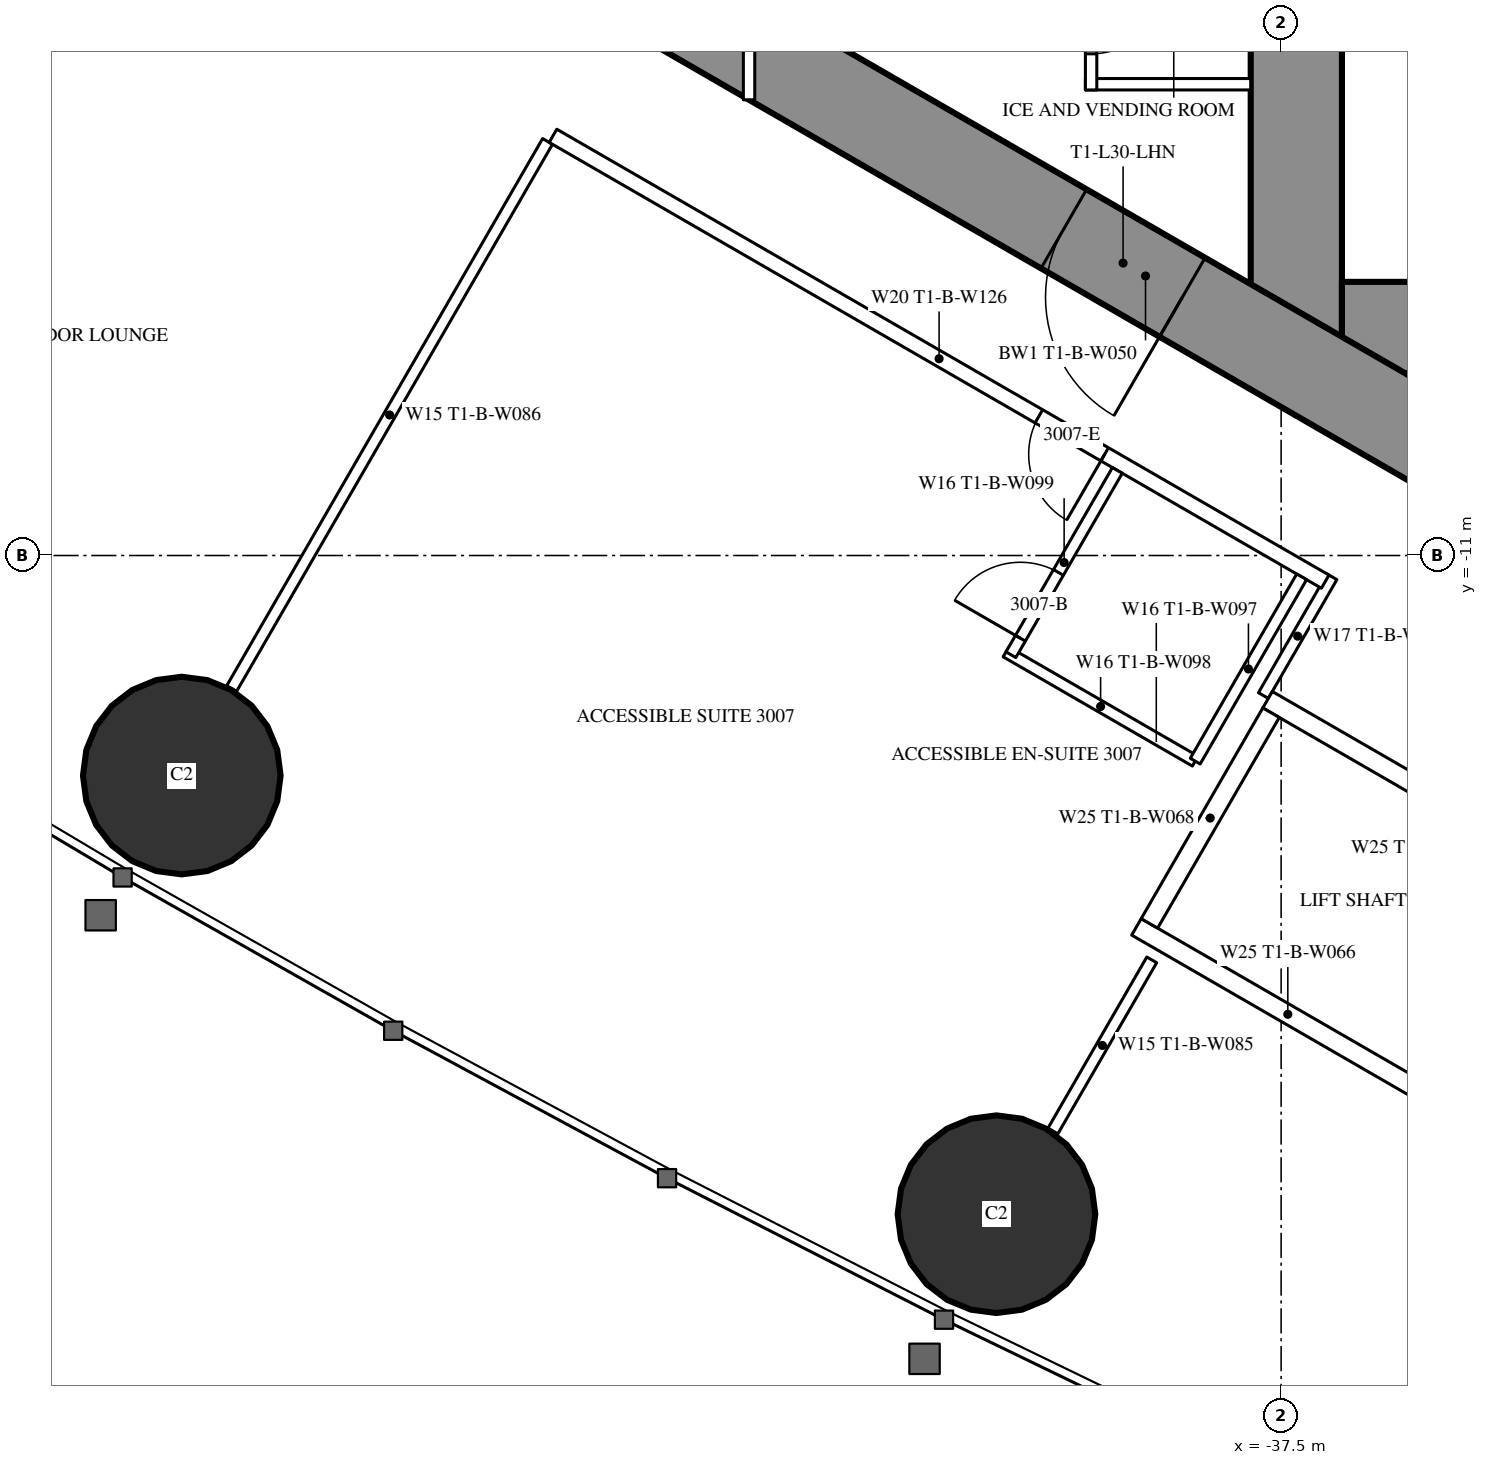
"""IFC4 building model, lengths in metres.
Left out: names, types, materials, properties, quantities, classifications, styles, units other than length and angle.
Written with IfcOpenShell. Run it as: python <this file> out.ifc"""

import sys

from ifc_helpers import new_model, si_unit, direction, frame, frame_2d, origin, origin_2d, place, context, subcontext, project, spatial, rectangle, hollow_circle, extrude, element, fill, save


model = new_model("IFC4")
c1 = context("Model", 3, precision=1e-05, world=origin(), true_north=direction((0.0, 1.0)))
c2 = subcontext(c1, "Body", "Model", "MODEL_VIEW")
j1 = project(units=[si_unit("LENGTHUNIT", "METRE"), si_unit("PLANEANGLEUNIT", "RADIAN")], contexts=[c1])
p1 = place(None, origin())
s1 = spatial("IfcSite", under=j1, at=p1, CompositionType="ELEMENT")
p2 = place(p1, origin())
s2 = spatial("IfcBuilding", under=s1, at=p2, CompositionType="ELEMENT")
p3 = place(p2, frame((0.0, 0.0, 115.1)))
s3 = spatial("IfcBuildingStorey", under=s2, at=p3, CompositionType="ELEMENT", Elevation=115.1)
for number, where, z_axis, x_axis in (
    (1, (-51.963, -13.895, 0.0), (0.0, 0.0, 1.0), (1.0, 0.0, 0.0)),
    (2, (-41.245, -19.666, 0.0), (0.0, 0.0, 1.0), (1.0, 0.0, 0.0)),
):
    element("IfcColumn", number, at=place(p3, frame(where, z_axis=z_axis, x_axis=x_axis)), inside=s3, PredefinedType="COLUMN", context=c2, shape_type="SweptSolid", body=[
        extrude(hollow_circle(Radius=1.3, WallThickness=0.1, at=origin_2d()), origin(), (0.0, 0.0, 1.0), 3.5),
    ])
p4 = place(p3, frame((-37.3, 8.6, 0.0), z_axis=(0.0, 0.0, 1.0), x_axis=(0.0, -1.0, 0.0)))
e3 = element("IfcWall", 3, at=p4, inside=s3, PredefinedType="SHEAR", context=c2, shape_type="SweptSolid", body=[
    extrude(rectangle(XDim=17.2, YDim=1.2, at=frame_2d((8.6, 0.0))), origin(), (0.0, 0.0, 1.0), 3.5),
])
p5 = place(p4, frame((7.7, 0.0, 0.0)))
e4 = element("IfcOpeningElement", 4, at=p5, cuts=e3, PredefinedType="OPENING", context=c2, shape_type="SweptSolid", body=[
    extrude(rectangle(XDim=1.8, YDim=2.2, at=frame_2d((0.9, 1.1))), frame((0.0, 0.61, 0.0), z_axis=(0.0, -1.0, 0.0), x_axis=(1.0, 0.0, 0.0)), (0.0, 0.0, 1.0), 1.22),
])
p6 = place(p3, frame((-28.3, -8.0, 0.0), z_axis=(0.0, 0.0, 1.0), x_axis=(-1.0, 0.0, 0.0)))
e5 = element("IfcWall", 5, at=p6, inside=s3, PredefinedType="SHEAR", context=c2, shape_type="SweptSolid", body=[
    extrude(rectangle(XDim=8.4, YDim=1.2, at=frame_2d((4.2, 0.0))), origin(), (0.0, 0.0, 1.0), 3.5),
])
p7 = place(p6, frame((0.25, 0.0, 0.0)))
e6 = element("IfcOpeningElement", 6, at=p7, cuts=e5, PredefinedType="OPENING", context=c2, shape_type="SweptSolid", body=[
    extrude(rectangle(XDim=1.0, YDim=2.2, at=frame_2d((0.5, 1.1))), frame((0.0, 0.61, 0.0), z_axis=(0.0, -1.0, 0.0), x_axis=(1.0, 0.0, 0.0)), (0.0, 0.0, 1.0), 1.22),
])
p8 = place(p3, frame((-27.2, -14.3, 0.0), z_axis=(0.0, 0.0, 1.0), x_axis=(-0.866024021859, 0.500002393557, 0.0)))
e7 = element("IfcWall", 7, at=p8, inside=s3, PredefinedType="SHEAR", context=c2, shape_type="SweptSolid", body=[
    extrude(rectangle(XDim=27.907, YDim=1.2, at=frame_2d((13.954, 0.0))), origin(), (0.0, 0.0, 1.0), 3.5),
])
p9 = place(p8, frame((4.6, 0.0, 0.0)))
e8 = element("IfcOpeningElement", 8, at=p9, cuts=e7, PredefinedType="OPENING", context=c2, shape_type="SweptSolid", body=[
    extrude(rectangle(XDim=1.0, YDim=2.2, at=frame_2d((0.5, 1.1))), frame((0.0, 0.61, 0.0), z_axis=(0.0, -1.0, 0.0), x_axis=(1.0, 0.0, 0.0)), (0.0, 0.0, 1.0), 1.22),
])
p10 = place(p8, frame((13.395, 0.0, 0.0)))
e9 = element("IfcOpeningElement", 9, at=p10, cuts=e7, PredefinedType="OPENING", context=c2, shape_type="SweptSolid", body=[
    extrude(rectangle(XDim=1.8, YDim=2.2, at=frame_2d((0.9, 1.1))), frame((0.0, 0.61, 0.0), z_axis=(0.0, -1.0, 0.0), x_axis=(1.0, 0.0, 0.0)), (0.0, 0.0, 1.0), 1.22),
])
p11 = place(p3, frame((-47.151, -5.552, 0.0), z_axis=(0.0, 0.0, 1.0), x_axis=(-0.500003012045, -0.866023664773, 0.0)))
e10 = element("IfcWall", 10, at=p11, inside=s3, PredefinedType="PARTITIONING", context=c2, shape_type="SweptSolid", body=[
    extrude(rectangle(XDim=8.311, YDim=0.15, at=frame_2d((4.156, 0.0))), origin(), (0.0, 0.0, 1.0), 2.2),
])
p12 = place(p3, frame((-39.202, -16.32, 0.0), z_axis=(0.0, 0.0, 1.0), x_axis=(-0.49997716683, -0.86603858612, 0.0)))
e11 = element("IfcWall", 11, at=p12, inside=s3, PredefinedType="PARTITIONING", context=c2, shape_type="SweptSolid", body=[
    extrude(rectangle(XDim=2.6, YDim=0.15, at=frame_2d((1.3, 0.0))), origin(), (0.0, 0.0, 1.0), 3.25),
])
p13 = place(p3, frame((-36.831, -11.28, 0.0), z_axis=(0.0, 0.0, 1.0), x_axis=(-0.499937177781, -0.866061671171, 0.0)))
e12 = element("IfcWall", 12, at=p13, inside=s3, PredefinedType="PARTITIONING", context=c2, shape_type="SweptSolid", body=[
    extrude(rectangle(XDim=1.804, YDim=0.15, at=frame_2d((0.902, 0.0))), origin(), (0.0, 0.0, 1.0), 3.25),
])
p14 = place(p3, frame((-36.92, -11.344, 0.0), z_axis=(0.0, 0.0, 1.0), x_axis=(-0.866027897759, 0.499995680284, 0.0)))
e13 = element("IfcWall", 13, at=p14, inside=s3, PredefinedType="PARTITIONING", context=c2, shape_type="SweptSolid", body=[
    extrude(rectangle(XDim=11.731, YDim=0.2, at=frame_2d((5.865, 0.0))), origin(), (0.0, 0.0, 1.0), 3.25),
])
p15 = place(p14, frame((3.35, 0.0, 0.0)))
e14 = element("IfcOpeningElement", 14, at=p15, cuts=e13, PredefinedType="OPENING", context=c2, shape_type="SweptSolid", body=[
    extrude(rectangle(XDim=1.0, YDim=2.2, at=frame_2d((0.5, 1.1))), frame((0.0, 0.11, 0.0), z_axis=(0.0, -1.0, 0.0), x_axis=(1.0, 0.0, 0.0)), (0.0, 0.0, 1.0), 0.22),
])
p16 = place(p3, frame((-38.63, -13.705, 0.0), z_axis=(0.0, 0.0, 1.0), x_axis=(-0.866018712932, 0.500011588718, 0.0)))
e15 = element("IfcWall", 15, at=p16, inside=s3, PredefinedType="PARTITIONING", context=c2, shape_type="SweptSolid", body=[
    extrude(rectangle(XDim=2.875, YDim=0.15, at=frame_2d((1.438, 0.0))), origin(), (0.0, 0.0, 1.0), 3.25),
])
p17 = place(p3, frame((-39.655, -9.88, 0.0), z_axis=(0.0, 0.0, 1.0), x_axis=(-0.500049511043, -0.865996816683, 0.0)))
e16 = element("IfcWall", 16, at=p17, inside=s3, PredefinedType="PARTITIONING", context=c2, shape_type="SweptSolid", body=[
    extrude(rectangle(XDim=2.8, YDim=0.15, at=frame_2d((1.4, 0.0))), origin(), (0.0, 0.0, 1.0), 3.25),
])
p18 = place(p17, frame((1.55, 0.0, 0.0)))
e17 = element("IfcOpeningElement", 17, at=p18, cuts=e16, PredefinedType="OPENING", context=c2, shape_type="SweptSolid", body=[
    extrude(rectangle(XDim=1.0, YDim=2.2, at=frame_2d((0.5, 1.1))), frame((0.0, 0.085, 0.0), z_axis=(0.0, -1.0, 0.0), x_axis=(1.0, 0.0, 0.0)), (0.0, 0.0, 1.0), 0.17),
])
p19 = place(p3, frame((-37.23, -11.281, 0.0), z_axis=(0.0, 0.0, 1.0), x_axis=(-0.500049511043, -0.865996816683, 0.0)))
e18 = element("IfcWall", 18, at=p19, inside=s3, PredefinedType="PARTITIONING", context=c2, shape_type="SweptSolid", body=[
    extrude(rectangle(XDim=2.8, YDim=0.15, at=frame_2d((1.4, 0.0))), origin(), (0.0, 0.0, 1.0), 3.25),
])
p20 = place(p3, frame((-37.9, -4.8, 0.0), z_axis=(0.0, 0.0, 1.0), x_axis=(-1.0, 0.0, 0.0)))
e19 = element("IfcWall", 19, at=p20, inside=s3, PredefinedType="PARTITIONING", context=c2, shape_type="SweptSolid", body=[
    extrude(rectangle(XDim=2.175, YDim=0.15, at=frame_2d((1.087, 0.0))), origin(), (0.0, 0.0, 1.0), 3.25),
])
p21 = place(p3, frame((-40.0, -2.925, 0.0), z_axis=(0.0, 0.0, 1.0), x_axis=(0.0, -1.0, 0.0)))
e20 = element("IfcWall", 20, at=p21, inside=s3, PredefinedType="PARTITIONING", context=c2, shape_type="SweptSolid", body=[
    extrude(rectangle(XDim=1.95, YDim=0.15, at=frame_2d((0.975, 0.0))), origin(), (0.0, 0.0, 1.0), 3.25),
])
p22 = place(p21, frame((0.475, 0.0, 0.0)))
e21 = element("IfcOpeningElement", 21, at=p22, cuts=e20, PredefinedType="OPENING", context=c2, shape_type="SweptSolid", body=[
    extrude(rectangle(XDim=1.0, YDim=2.2, at=frame_2d((0.5, 1.1))), frame((0.0, 0.085, 0.0), z_axis=(0.0, -1.0, 0.0), x_axis=(1.0, 0.0, 0.0)), (0.0, 0.0, 1.0), 0.17),
])
p23 = place(p3, frame((-44.5, 5.005, 0.0), z_axis=(0.0, 0.0, 1.0), x_axis=(0.0, -1.0, 0.0)))
e22 = element("IfcWall", 22, at=p23, inside=s3, PredefinedType="PARTITIONING", context=c2, shape_type="SweptSolid", body=[
    extrude(rectangle(XDim=10.009, YDim=0.15, at=frame_2d((5.005, 0.0))), origin(), (0.0, 0.0, 1.0), 2.45),
])
p24 = place(p23, frame((2.002, 0.0, 0.0)))
e23 = element("IfcOpeningElement", 23, at=p24, cuts=e22, PredefinedType="OPENING", context=c2, shape_type="SweptSolid", body=[
    extrude(rectangle(XDim=1.0, YDim=2.2, at=frame_2d((0.5, 1.1))), frame((0.0, 0.085, 0.0), z_axis=(0.0, -1.0, 0.0), x_axis=(1.0, 0.0, 0.0)), (0.0, 0.0, 1.0), 0.17),
])
p25 = place(p23, frame((7.007, 0.0, 0.0)))
e24 = element("IfcOpeningElement", 24, at=p25, cuts=e22, PredefinedType="OPENING", context=c2, shape_type="SweptSolid", body=[
    extrude(rectangle(XDim=1.0, YDim=2.2, at=frame_2d((0.5, 1.1))), frame((0.0, 0.085, 0.0), z_axis=(0.0, -1.0, 0.0), x_axis=(1.0, 0.0, 0.0)), (0.0, 0.0, 1.0), 0.17),
])
p26 = place(p3, frame((-33.696, -15.197, 0.0), z_axis=(0.0, 0.0, 1.0), x_axis=(-0.865976953817, 0.500083908417, 0.0)))
e25 = element("IfcWall", 25, at=p26, inside=s3, PredefinedType="PARTITIONING", context=c2, shape_type="SweptSolid", body=[
    extrude(rectangle(XDim=4.599, YDim=0.25, at=frame_2d((2.3, 0.0))), origin(), (0.0, 0.0, 1.0), 3.25),
])
p27 = place(p3, frame((-35.42, -18.186, 0.0), z_axis=(0.0, 0.0, 1.0), x_axis=(-0.865990227814, 0.50006092162, 0.0)))
e26 = element("IfcWall", 26, at=p27, inside=s3, PredefinedType="PARTITIONING", context=c2, shape_type="SweptSolid", body=[
    extrude(rectangle(XDim=4.6, YDim=0.25, at=frame_2d((2.3, 0.0))), origin(), (0.0, 0.0, 1.0), 3.25),
])
p28 = place(p3, frame((-37.633, -13.068, 0.0), z_axis=(0.0, 0.0, 1.0), x_axis=(-0.499872130319, -0.866099216793, 0.0)))
e27 = element("IfcWall", 27, at=p28, inside=s3, PredefinedType="PARTITIONING", context=c2, shape_type="SweptSolid", body=[
    extrude(rectangle(XDim=3.2, YDim=0.25, at=frame_2d((1.6, 0.0))), origin(), (0.0, 0.0, 1.0), 3.25),
])
p29 = place(p18, origin())
e28 = element("IfcDoor", 28, at=p29, inside=s3, OperationType="SINGLE_SWING_RIGHT", PredefinedType="DOOR", context=c2, shape_type="SweptSolid", body=[
    extrude(rectangle(XDim=1.0, YDim=2.2, at=frame_2d((0.5, 1.1))), frame((0.0, 0.025, 0.0), z_axis=(0.0, -1.0, 0.0), x_axis=(1.0, 0.0, 0.0)), (0.0, 0.0, 1.0), 0.05),
])
fill(e17, e28)
p30 = place(p15, origin())
e29 = element("IfcDoor", 29, at=p30, inside=s3, OperationType="SINGLE_SWING_LEFT", PredefinedType="DOOR", context=c2, shape_type="SweptSolid", body=[
    extrude(rectangle(XDim=1.0, YDim=2.2, at=frame_2d((0.5, 1.1))), frame((0.0, 0.025, 0.0), z_axis=(0.0, -1.0, 0.0), x_axis=(1.0, 0.0, 0.0)), (0.0, 0.0, 1.0), 0.05),
])
fill(e14, e29)
p31 = place(p22, origin())
e30 = element("IfcDoor", 30, at=p31, inside=s3, OperationType="SINGLE_SWING_LEFT", PredefinedType="DOOR", context=c2, shape_type="SweptSolid", body=[
    extrude(rectangle(XDim=1.0, YDim=2.2, at=frame_2d((0.5, 1.1))), frame((0.0, 0.025, 0.0), z_axis=(0.0, -1.0, 0.0), x_axis=(1.0, 0.0, 0.0)), (0.0, 0.0, 1.0), 0.05),
])
fill(e21, e30)
p32 = place(p10, origin())
e31 = element("IfcDoor", 31, at=p32, inside=s3, OperationType="DOUBLE_DOOR_SINGLE_SWING", PredefinedType="DOOR", context=c2, shape_type="SweptSolid", body=[
    extrude(rectangle(XDim=1.8, YDim=2.2, at=frame_2d((0.9, 1.1))), frame((0.0, 0.025, 0.0), z_axis=(0.0, -1.0, 0.0), x_axis=(1.0, 0.0, 0.0)), (0.0, 0.0, 1.0), 0.05),
])
fill(e9, e31)
save(model, sys.argv[1])
